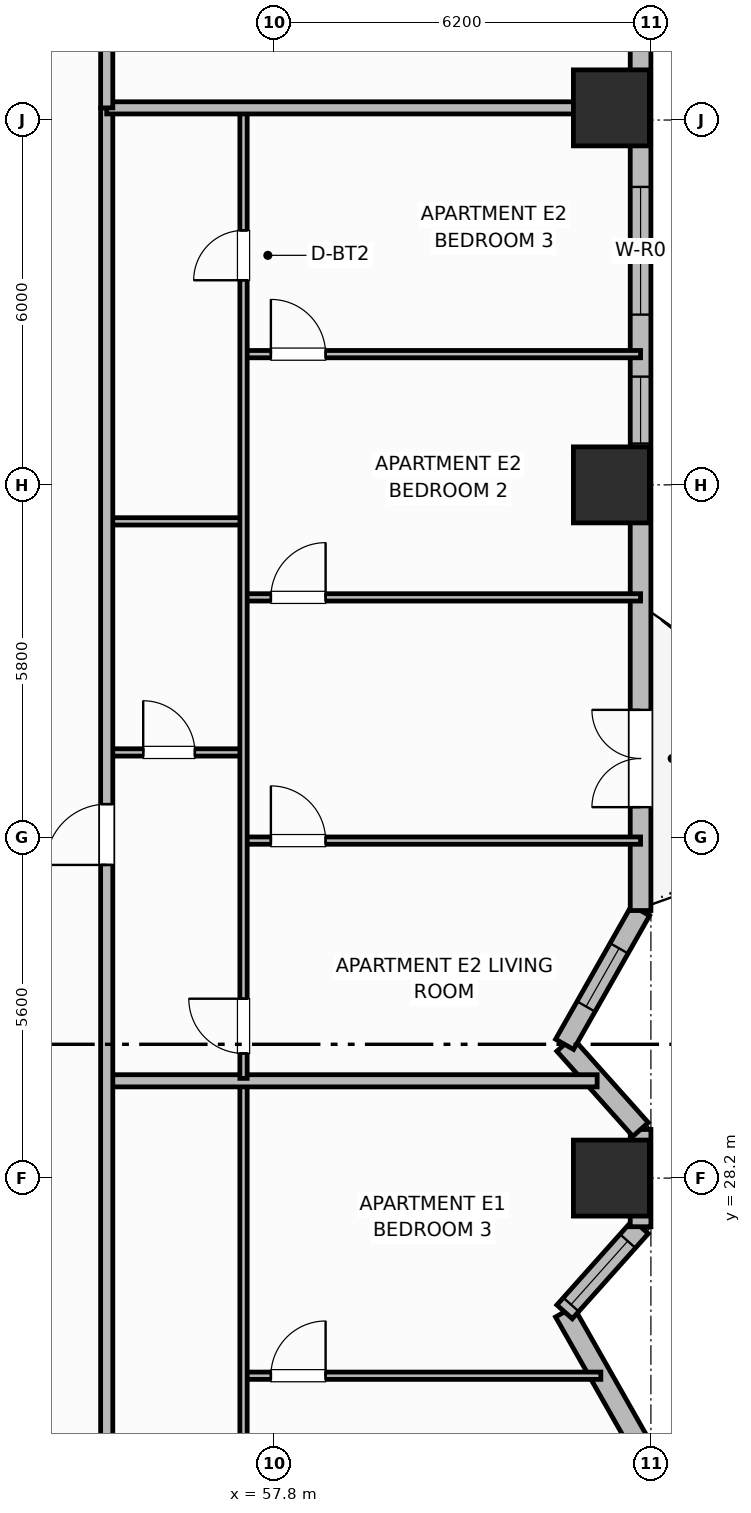
"""IFC4 building model, lengths in metres.
Left out: names, types, materials, properties, quantities, classifications, styles, units other than length and angle.
Written with IfcOpenShell. Run it as: python <this file> out.ifc"""

import sys

from ifc_helpers import new_model, si_unit, direction, frame, frame_2d, origin, origin_2d, place, context, subcontext, project, spatial, rectangle, extrude, element, fill, save


model = new_model("IFC4")
c1 = context("Model", 3, precision=1e-05, world=origin(), true_north=direction((0.0, 1.0)))
c2 = subcontext(c1, "Body", "Model", "MODEL_VIEW")
j1 = project(units=[si_unit("LENGTHUNIT", "METRE"), si_unit("PLANEANGLEUNIT", "RADIAN")], contexts=[c1])
p1 = place(None, origin())
s1 = spatial("IfcSite", under=j1, at=p1, CompositionType="ELEMENT")
p2 = place(p1, origin())
s2 = spatial("IfcBuilding", under=s1, at=p2, CompositionType="ELEMENT")
p3 = place(p2, frame((0.0, 0.0, 51.0)))
s3 = spatial("IfcBuildingStorey", under=s2, at=p3, CompositionType="ELEMENT", Elevation=51.0)
for number, where, z_axis, x_axis in (
    (1, (63.35, 28.2, 0.0), (0.0, 0.0, 1.0), (1.0, 0.0, 0.0)),
    (2, (63.35, 39.6, 0.0), (0.0, 0.0, 1.0), (1.0, 0.0, 0.0)),
    (3, (63.35, 45.8, 0.0), (0.0, 0.0, 1.0), (1.0, 0.0, 0.0)),
):
    element("IfcColumn", number, at=place(p3, frame(where, z_axis=z_axis, x_axis=x_axis)), inside=s3, PredefinedType="COLUMN", context=c2, shape_type="SweptSolid", body=[
        extrude(rectangle(XDim=1.25, YDim=1.25, at=origin_2d()), origin(), (0.0, 0.0, 1.0), 3.7),
    ])
p4 = place(p3, frame((63.83, 23.8, 0.0), z_axis=(0.0, 0.0, 1.0), x_axis=(-0.494017696272, 0.869451847873, 0.0)))
e4 = element("IfcWall", 4, at=p4, inside=s3, PredefinedType="SOLIDWALL", context=c2, shape_type="SweptSolid", body=[
    extrude(rectangle(XDim=2.53, YDim=0.34, at=frame_2d((1.265, 0.0))), origin(), (0.0, 0.0, 1.0), 2.7),
])
p5 = place(p3, frame((62.58, 26.0, 0.0), z_axis=(0.0, 0.0, 1.0), x_axis=(0.666041619974, 0.74591457987, 0.0)))
e5 = element("IfcWall", 5, at=p5, inside=s3, PredefinedType="SOLIDWALL", context=c2, shape_type="SweptSolid", body=[
    extrude(rectangle(XDim=1.877, YDim=0.34, at=frame_2d((0.938, 0.0))), origin(), (0.0, 0.0, 1.0), 2.7),
])
p6 = place(p5, frame((0.16, 0.0, 0.69)))
e6 = element("IfcOpeningElement", 6, at=p6, cuts=e5, PredefinedType="OPENING", context=c2, shape_type="SweptSolid", body=[
    extrude(rectangle(XDim=1.4, YDim=1.85, at=frame_2d((0.7, 0.925))), frame((0.0, 0.18, 0.0), z_axis=(0.0, -1.0, 0.0), x_axis=(1.0, 0.0, 0.0)), (0.0, 0.0, 1.0), 0.36),
])
p7 = place(p3, frame((63.83, 27.4, 0.0), z_axis=(0.0, 0.0, 1.0), x_axis=(0.0, 1.0, 0.0)))
e7 = element("IfcWall", 7, at=p7, inside=s3, PredefinedType="SOLIDWALL", context=c2, shape_type="SweptSolid", body=[
    extrude(rectangle(XDim=1.6, YDim=0.34, at=frame_2d((0.8, 0.0))), origin(), (0.0, 0.0, 1.0), 2.7),
])
p8 = place(p3, frame((63.83, 29.0, 0.0), z_axis=(0.0, 0.0, 1.0), x_axis=(-0.666041619974, 0.74591457987, 0.0)))
e8 = element("IfcWall", 8, at=p8, inside=s3, PredefinedType="SOLIDWALL", context=c2, shape_type="SweptSolid", body=[
    extrude(rectangle(XDim=1.877, YDim=0.34, at=frame_2d((0.938, 0.0))), origin(), (0.0, 0.0, 1.0), 2.7),
])
p9 = place(p3, frame((62.58, 30.4, 0.0), z_axis=(0.0, 0.0, 1.0), x_axis=(0.493976255291, 0.869475393101, 0.0)))
e9 = element("IfcWall", 9, at=p9, inside=s3, PredefinedType="SOLIDWALL", context=c2, shape_type="SweptSolid", body=[
    extrude(rectangle(XDim=2.531, YDim=0.34, at=frame_2d((1.265, 0.0))), origin(), (0.0, 0.0, 1.0), 2.7),
])
p10 = place(p9, frame((0.715, 0.0, 0.89)))
e10 = element("IfcOpeningElement", 10, at=p10, cuts=e9, PredefinedType="OPENING", context=c2, shape_type="SweptSolid", body=[
    extrude(rectangle(XDim=1.1, YDim=1.65, at=frame_2d((0.55, 0.825))), frame((0.0, 0.18, 0.0), z_axis=(0.0, -1.0, 0.0), x_axis=(1.0, 0.0, 0.0)), (0.0, 0.0, 1.0), 0.36),
])
p11 = place(p3, frame((63.83, 32.6, 0.0), z_axis=(0.0, 0.0, 1.0), x_axis=(0.0, 1.0, 0.0)))
e11 = element("IfcWall", 11, at=p11, inside=s3, PredefinedType="SOLIDWALL", context=c2, shape_type="SweptSolid", body=[
    extrude(rectangle(XDim=14.8, YDim=0.34, at=frame_2d((7.4, 0.0))), origin(), (0.0, 0.0, 1.0), 2.7),
])
p12 = place(p11, frame((1.7, 0.0, 0.0)))
e12 = element("IfcOpeningElement", 12, at=p12, cuts=e11, PredefinedType="OPENING", context=c2, shape_type="SweptSolid", body=[
    extrude(rectangle(XDim=1.6, YDim=2.1, at=frame_2d((0.8, 1.05))), frame((0.0, 0.18, 0.0), z_axis=(0.0, -1.0, 0.0), x_axis=(1.0, 0.0, 0.0)), (0.0, 0.0, 1.0), 0.36),
])
p13 = place(p11, frame((7.68, 0.0, 0.89)))
e13 = element("IfcOpeningElement", 13, at=p13, cuts=e11, PredefinedType="OPENING", context=c2, shape_type="SweptSolid", body=[
    extrude(rectangle(XDim=1.1, YDim=1.65, at=frame_2d((0.55, 0.825))), frame((0.0, 0.18, 0.0), z_axis=(0.0, -1.0, 0.0), x_axis=(1.0, 0.0, 0.0)), (0.0, 0.0, 1.0), 0.36),
])
p14 = place(p11, frame((9.8, 0.0, 0.68)))
e14 = element("IfcOpeningElement", 14, at=p14, cuts=e11, PredefinedType="OPENING", context=c2, shape_type="SweptSolid", body=[
    extrude(rectangle(XDim=2.1, YDim=1.9, at=frame_2d((1.05, 0.95))), frame((0.0, 0.18, 0.0), z_axis=(0.0, -1.0, 0.0), x_axis=(1.0, 0.0, 0.0)), (0.0, 0.0, 1.0), 0.36),
])
p15 = place(p3, frame((57.3, 24.95, 0.0), z_axis=(0.0, 0.0, 1.0), x_axis=(1.0, 0.0, 0.0)))
e15 = element("IfcWall", 15, at=p15, inside=s3, PredefinedType="PARTITIONING", context=c2, shape_type="SweptSolid", body=[
    extrude(rectangle(XDim=5.876, YDim=0.12, at=frame_2d((2.938, 0.0))), origin(), (0.0, 0.0, 1.0), 2.53),
])
p16 = place(p15, frame((0.45, 0.0, 0.0)))
e16 = element("IfcOpeningElement", 16, at=p16, cuts=e15, PredefinedType="OPENING", context=c2, shape_type="SweptSolid", body=[
    extrude(rectangle(XDim=0.9, YDim=2.1, at=frame_2d((0.45, 1.05))), frame((0.0, 0.07, 0.0), z_axis=(0.0, -1.0, 0.0), x_axis=(1.0, 0.0, 0.0)), (0.0, 0.0, 1.0), 0.14),
])
p17 = place(p3, frame((57.3, 10.64, 0.0), z_axis=(0.0, 0.0, 1.0), x_axis=(0.0, 1.0, 0.0)))
e17 = element("IfcWall", 17, at=p17, inside=s3, PredefinedType="PARTITIONING", context=c2, shape_type="SweptSolid", body=[
    extrude(rectangle(XDim=19.12, YDim=0.12, at=frame_2d((9.56, 0.0))), origin(), (0.0, 0.0, 1.0), 2.53),
])
p18 = place(p17, frame((0.41, 0.0, 0.0)))
e18 = element("IfcOpeningElement", 18, at=p18, cuts=e17, PredefinedType="OPENING", context=c2, shape_type="SweptSolid", body=[
    extrude(rectangle(XDim=0.9, YDim=2.1, at=frame_2d((0.45, 1.05))), frame((0.0, 0.07, 0.0), z_axis=(0.0, -1.0, 0.0), x_axis=(1.0, 0.0, 0.0)), (0.0, 0.0, 1.0), 0.14),
])
p19 = place(p17, frame((12.105, 0.0, 0.0)))
e19 = element("IfcOpeningElement", 19, at=p19, cuts=e17, PredefinedType="OPENING", context=c2, shape_type="SweptSolid", body=[
    extrude(rectangle(XDim=0.82, YDim=2.08, at=frame_2d((0.41, 1.04))), frame((0.0, 0.07, 0.0), z_axis=(0.0, -1.0, 0.0), x_axis=(1.0, 0.0, 0.0)), (0.0, 0.0, 1.0), 0.14),
])
p20 = place(p3, frame((55.05, 29.8, 0.0), z_axis=(0.0, 0.0, 1.0), x_axis=(1.0, 0.0, 0.0)))
e20 = element("IfcWall", 20, at=p20, inside=s3, PredefinedType="PARTITIONING", context=c2, shape_type="SweptSolid", body=[
    extrude(rectangle(XDim=8.066, YDim=0.2, at=frame_2d((4.033, 0.0))), origin(), (0.0, 0.0, 1.0), 2.53),
])
p21 = place(p3, frame((55.05, 35.2, 0.0), z_axis=(0.0, 0.0, 1.0), x_axis=(1.0, 0.0, 0.0)))
e21 = element("IfcWall", 21, at=p21, inside=s3, PredefinedType="PARTITIONING", context=c2, shape_type="SweptSolid", body=[
    extrude(rectangle(XDim=2.25, YDim=0.12, at=frame_2d((1.125, 0.0))), origin(), (0.0, 0.0, 1.0), 2.53),
])
p22 = place(p21, frame((0.6, 0.0, 0.0)))
e22 = element("IfcOpeningElement", 22, at=p22, cuts=e21, PredefinedType="OPENING", context=c2, shape_type="SweptSolid", body=[
    extrude(rectangle(XDim=0.85, YDim=2.1, at=frame_2d((0.425, 1.05))), frame((0.0, 0.07, 0.0), z_axis=(0.0, -1.0, 0.0), x_axis=(1.0, 0.0, 0.0)), (0.0, 0.0, 1.0), 0.14),
])
p23 = place(p3, frame((55.05, 39.0, 0.0), z_axis=(0.0, 0.0, 1.0), x_axis=(1.0, 0.0, 0.0)))
e23 = element("IfcWall", 23, at=p23, inside=s3, PredefinedType="PARTITIONING", context=c2, shape_type="SweptSolid", body=[
    extrude(rectangle(XDim=2.25, YDim=0.12, at=frame_2d((1.125, 0.0))), origin(), (0.0, 0.0, 1.0), 2.53),
])
p24 = place(p3, frame((57.3, 33.75, 0.0), z_axis=(0.0, 0.0, 1.0), x_axis=(1.0, 0.0, 0.0)))
e24 = element("IfcWall", 24, at=p24, inside=s3, PredefinedType="PARTITIONING", context=c2, shape_type="SweptSolid", body=[
    extrude(rectangle(XDim=6.53, YDim=0.12, at=frame_2d((3.265, 0.0))), origin(), (0.0, 0.0, 1.0), 2.53),
])
p25 = place(p24, frame((0.45, 0.0, 0.0)))
e25 = element("IfcOpeningElement", 25, at=p25, cuts=e24, PredefinedType="OPENING", context=c2, shape_type="SweptSolid", body=[
    extrude(rectangle(XDim=0.9, YDim=2.1, at=frame_2d((0.45, 1.05))), frame((0.0, 0.07, 0.0), z_axis=(0.0, -1.0, 0.0), x_axis=(1.0, 0.0, 0.0)), (0.0, 0.0, 1.0), 0.14),
])
p26 = place(p3, frame((57.3, 37.75, 0.0), z_axis=(0.0, 0.0, 1.0), x_axis=(1.0, 0.0, 0.0)))
e26 = element("IfcWall", 26, at=p26, inside=s3, PredefinedType="PARTITIONING", context=c2, shape_type="SweptSolid", body=[
    extrude(rectangle(XDim=6.53, YDim=0.12, at=frame_2d((3.265, 0.0))), origin(), (0.0, 0.0, 1.0), 2.53),
])
p27 = place(p26, frame((0.45, 0.0, 0.0)))
e27 = element("IfcOpeningElement", 27, at=p27, cuts=e26, PredefinedType="OPENING", context=c2, shape_type="SweptSolid", body=[
    extrude(rectangle(XDim=0.9, YDim=2.1, at=frame_2d((0.45, 1.05))), frame((0.0, 0.07, 0.0), z_axis=(0.0, -1.0, 0.0), x_axis=(1.0, 0.0, 0.0)), (0.0, 0.0, 1.0), 0.14),
])
p28 = place(p3, frame((57.3, 41.75, 0.0), z_axis=(0.0, 0.0, 1.0), x_axis=(1.0, 0.0, 0.0)))
e28 = element("IfcWall", 28, at=p28, inside=s3, PredefinedType="PARTITIONING", context=c2, shape_type="SweptSolid", body=[
    extrude(rectangle(XDim=6.53, YDim=0.12, at=frame_2d((3.265, 0.0))), origin(), (0.0, 0.0, 1.0), 2.53),
])
p29 = place(p28, frame((0.45, 0.0, 0.0)))
e29 = element("IfcOpeningElement", 29, at=p29, cuts=e28, PredefinedType="OPENING", context=c2, shape_type="SweptSolid", body=[
    extrude(rectangle(XDim=0.9, YDim=2.1, at=frame_2d((0.45, 1.05))), frame((0.0, 0.07, 0.0), z_axis=(0.0, -1.0, 0.0), x_axis=(1.0, 0.0, 0.0)), (0.0, 0.0, 1.0), 0.14),
])
p30 = place(p3, frame((57.3, 29.84, 0.0), z_axis=(0.0, 0.0, 1.0), x_axis=(0.0, 1.0, 0.0)))
e30 = element("IfcWall", 30, at=p30, inside=s3, PredefinedType="PARTITIONING", context=c2, shape_type="SweptSolid", body=[
    extrude(rectangle(XDim=15.92, YDim=0.12, at=frame_2d((7.96, 0.0))), origin(), (0.0, 0.0, 1.0), 2.53),
])
p31 = place(p30, frame((0.41, 0.0, 0.0)))
e31 = element("IfcOpeningElement", 31, at=p31, cuts=e30, PredefinedType="OPENING", context=c2, shape_type="SweptSolid", body=[
    extrude(rectangle(XDim=0.9, YDim=2.1, at=frame_2d((0.45, 1.05))), frame((0.0, 0.07, 0.0), z_axis=(0.0, -1.0, 0.0), x_axis=(1.0, 0.0, 0.0)), (0.0, 0.0, 1.0), 0.14),
])
p32 = place(p30, frame((13.125, 0.0, 0.0)))
e32 = element("IfcOpeningElement", 32, at=p32, cuts=e30, PredefinedType="OPENING", context=c2, shape_type="SweptSolid", body=[
    extrude(rectangle(XDim=0.82, YDim=2.08, at=frame_2d((0.41, 1.04))), frame((0.0, 0.07, 0.0), z_axis=(0.0, -1.0, 0.0), x_axis=(1.0, 0.0, 0.0)), (0.0, 0.0, 1.0), 0.14),
])
p33 = place(p3, frame((55.05, 10.6, 0.0), z_axis=(0.0, 0.0, 1.0), x_axis=(0.0, 1.0, 0.0)))
e33 = element("IfcWall", 33, at=p33, inside=s3, PredefinedType="PARTITIONING", context=c2, shape_type="SweptSolid", body=[
    extrude(rectangle(XDim=35.2, YDim=0.2, at=frame_2d((17.6, 0.0))), origin(), (0.0, 0.0, 1.0), 2.53),
])
p34 = place(p33, frame((2.65, 0.0, 0.0)))
e34 = element("IfcOpeningElement", 34, at=p34, cuts=e33, PredefinedType="OPENING", context=c2, shape_type="SweptSolid", body=[
    extrude(rectangle(XDim=1.0, YDim=2.15, at=frame_2d((0.5, 1.075))), frame((0.0, 0.11, 0.0), z_axis=(0.0, -1.0, 0.0), x_axis=(1.0, 0.0, 0.0)), (0.0, 0.0, 1.0), 0.22),
])
p35 = place(p33, frame((22.75, 0.0, 0.0)))
e35 = element("IfcOpeningElement", 35, at=p35, cuts=e33, PredefinedType="OPENING", context=c2, shape_type="SweptSolid", body=[
    extrude(rectangle(XDim=1.0, YDim=2.15, at=frame_2d((0.5, 1.075))), frame((0.0, 0.11, 0.0), z_axis=(0.0, -1.0, 0.0), x_axis=(1.0, 0.0, 0.0)), (0.0, 0.0, 1.0), 0.22),
])
p36 = place(p3, frame((55.05, 45.8, 0.0), z_axis=(0.0, 0.0, 1.0), x_axis=(1.0, 0.0, 0.0)))
e36 = element("IfcWall", 36, at=p36, inside=s3, PredefinedType="PARTITIONING", context=c2, shape_type="SweptSolid", body=[
    extrude(rectangle(XDim=8.36, YDim=0.2, at=frame_2d((4.18, 0.0))), origin(), (0.0, 0.0, 1.0), 2.53),
])
p37 = place(p3, frame((55.05, 45.8, 0.0), z_axis=(0.0, 0.0, 1.0), x_axis=(0.0, 1.0, 0.0)))
e37 = element("IfcWall", 37, at=p37, inside=s3, PredefinedType="PARTITIONING", context=c2, shape_type="SweptSolid", body=[
    extrude(rectangle(XDim=5.63, YDim=0.2, at=frame_2d((2.815, 0.0))), origin(), (0.0, 0.0, 1.0), 2.53),
])
p38 = place(p6, origin())
e38 = element("IfcWindow", 38, at=p38, inside=s3, PartitioningType="SINGLE_PANEL", PredefinedType="WINDOW", context=c2, shape_type="SweptSolid", body=[
    extrude(rectangle(XDim=1.4, YDim=1.85, at=frame_2d((0.7, 0.925))), frame((0.0, 0.03, 0.0), z_axis=(0.0, -1.0, 0.0), x_axis=(1.0, 0.0, 0.0)), (0.0, 0.0, 1.0), 0.06),
])
fill(e6, e38)
p39 = place(p10, origin())
e39 = element("IfcWindow", 39, at=p39, inside=s3, PartitioningType="SINGLE_PANEL", PredefinedType="WINDOW", context=c2, shape_type="SweptSolid", body=[
    extrude(rectangle(XDim=1.1, YDim=1.65, at=frame_2d((0.55, 0.825))), frame((0.0, 0.03, 0.0), z_axis=(0.0, -1.0, 0.0), x_axis=(1.0, 0.0, 0.0)), (0.0, 0.0, 1.0), 0.06),
])
fill(e10, e39)
p40 = place(p12, origin())
e40 = element("IfcDoor", 40, at=p40, inside=s3, OperationType="DOUBLE_DOOR_SINGLE_SWING", PredefinedType="DOOR", context=c2, shape_type="SweptSolid", body=[
    extrude(rectangle(XDim=1.6, YDim=2.1, at=frame_2d((0.8, 1.05))), frame((0.0, 0.025, 0.0), z_axis=(0.0, -1.0, 0.0), x_axis=(1.0, 0.0, 0.0)), (0.0, 0.0, 1.0), 0.05),
])
fill(e12, e40)
p41 = place(p13, origin())
e41 = element("IfcWindow", 41, at=p41, inside=s3, PartitioningType="SINGLE_PANEL", PredefinedType="WINDOW", context=c2, shape_type="SweptSolid", body=[
    extrude(rectangle(XDim=1.1, YDim=1.65, at=frame_2d((0.55, 0.825))), frame((0.0, 0.03, 0.0), z_axis=(0.0, -1.0, 0.0), x_axis=(1.0, 0.0, 0.0)), (0.0, 0.0, 1.0), 0.06),
])
fill(e13, e41)
p42 = place(p14, origin())
e42 = element("IfcWindow", 42, at=p42, inside=s3, PartitioningType="SINGLE_PANEL", PredefinedType="WINDOW", context=c2, shape_type="SweptSolid", body=[
    extrude(rectangle(XDim=2.1, YDim=1.9, at=frame_2d((1.05, 0.95))), frame((0.0, 0.03, 0.0), z_axis=(0.0, -1.0, 0.0), x_axis=(1.0, 0.0, 0.0)), (0.0, 0.0, 1.0), 0.06),
])
fill(e14, e42)
p43 = place(p16, origin())
e43 = element("IfcDoor", 43, at=p43, inside=s3, OperationType="SINGLE_SWING_RIGHT", PredefinedType="DOOR", context=c2, shape_type="SweptSolid", body=[
    extrude(rectangle(XDim=0.9, YDim=2.1, at=frame_2d((0.45, 1.05))), frame((0.0, 0.025, 0.0), z_axis=(0.0, -1.0, 0.0), x_axis=(1.0, 0.0, 0.0)), (0.0, 0.0, 1.0), 0.05),
])
fill(e16, e43)
p44 = place(p22, origin())
e44 = element("IfcDoor", 44, at=p44, inside=s3, OperationType="SINGLE_SWING_LEFT", PredefinedType="DOOR", context=c2, shape_type="SweptSolid", body=[
    extrude(rectangle(XDim=0.85, YDim=2.1, at=frame_2d((0.425, 1.05))), frame((0.0, 0.025, 0.0), z_axis=(0.0, -1.0, 0.0), x_axis=(1.0, 0.0, 0.0)), (0.0, 0.0, 1.0), 0.05),
])
fill(e22, e44)
p45 = place(p25, origin())
e45 = element("IfcDoor", 45, at=p45, inside=s3, OperationType="SINGLE_SWING_LEFT", PredefinedType="DOOR", context=c2, shape_type="SweptSolid", body=[
    extrude(rectangle(XDim=0.9, YDim=2.1, at=frame_2d((0.45, 1.05))), frame((0.0, 0.025, 0.0), z_axis=(0.0, -1.0, 0.0), x_axis=(1.0, 0.0, 0.0)), (0.0, 0.0, 1.0), 0.05),
])
fill(e25, e45)
p46 = place(p27, origin())
e46 = element("IfcDoor", 46, at=p46, inside=s3, OperationType="SINGLE_SWING_RIGHT", PredefinedType="DOOR", context=c2, shape_type="SweptSolid", body=[
    extrude(rectangle(XDim=0.9, YDim=2.1, at=frame_2d((0.45, 1.05))), frame((0.0, 0.025, 0.0), z_axis=(0.0, -1.0, 0.0), x_axis=(1.0, 0.0, 0.0)), (0.0, 0.0, 1.0), 0.05),
])
fill(e27, e46)
p47 = place(p29, origin())
e47 = element("IfcDoor", 47, at=p47, inside=s3, OperationType="SINGLE_SWING_LEFT", PredefinedType="DOOR", context=c2, shape_type="SweptSolid", body=[
    extrude(rectangle(XDim=0.9, YDim=2.1, at=frame_2d((0.45, 1.05))), frame((0.0, 0.025, 0.0), z_axis=(0.0, -1.0, 0.0), x_axis=(1.0, 0.0, 0.0)), (0.0, 0.0, 1.0), 0.05),
])
fill(e29, e47)
p48 = place(p31, origin())
e48 = element("IfcDoor", 48, at=p48, inside=s3, OperationType="SINGLE_SWING_RIGHT", PredefinedType="DOOR", context=c2, shape_type="SweptSolid", body=[
    extrude(rectangle(XDim=0.9, YDim=2.1, at=frame_2d((0.45, 1.05))), frame((0.0, 0.025, 0.0), z_axis=(0.0, -1.0, 0.0), x_axis=(1.0, 0.0, 0.0)), (0.0, 0.0, 1.0), 0.05),
])
fill(e31, e48)
p49 = place(p32, origin())
e49 = element("IfcDoor", 49, at=p49, inside=s3, OperationType="SINGLE_SWING_LEFT", PredefinedType="DOOR", context=c2, shape_type="SweptSolid", body=[
    extrude(rectangle(XDim=0.82, YDim=2.08, at=frame_2d((0.41, 1.04))), frame((0.0, 0.025, 0.0), z_axis=(0.0, -1.0, 0.0), x_axis=(1.0, 0.0, 0.0)), (0.0, 0.0, 1.0), 0.05),
])
fill(e32, e49)
p50 = place(p35, origin())
e50 = element("IfcDoor", 50, at=p50, inside=s3, OperationType="SINGLE_SWING_LEFT", PredefinedType="DOOR", context=c2, shape_type="SweptSolid", body=[
    extrude(rectangle(XDim=1.0, YDim=2.15, at=frame_2d((0.5, 1.075))), frame((0.0, 0.025, 0.0), z_axis=(0.0, -1.0, 0.0), x_axis=(1.0, 0.0, 0.0)), (0.0, 0.0, 1.0), 0.05),
])
fill(e35, e50)
save(model, sys.argv[1])
